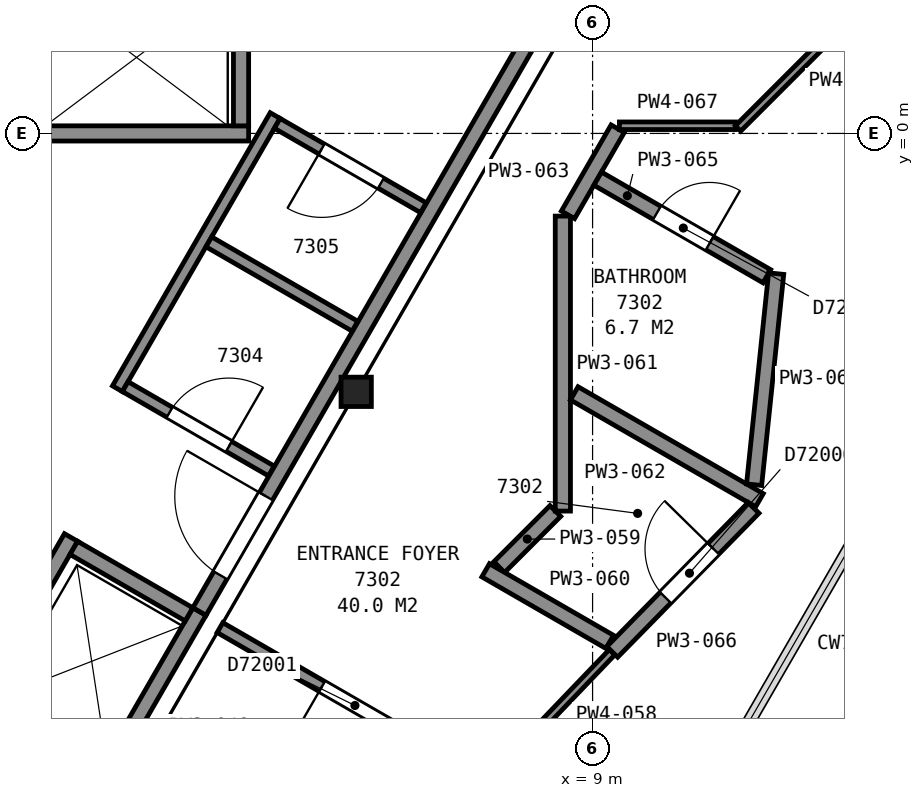
"""IFC4 building model, lengths in metres.
Left out: names, types, materials, properties, quantities, classifications, styles, units other than length and angle.
Written with IfcOpenShell. Run it as: python <this file> out.ifc"""

import sys

from ifc_helpers import new_model, si_unit, direction, frame, frame_2d, origin, origin_2d, place, context, subcontext, project, spatial, rectangle, i_section, extrude, element, fill, save


model = new_model("IFC4")
c1 = context("Model", 3, precision=1e-05, world=origin(), true_north=direction((0.0, 1.0)))
c2 = subcontext(c1, "Body", "Model", "MODEL_VIEW")
j1 = project(units=[si_unit("LENGTHUNIT", "METRE"), si_unit("PLANEANGLEUNIT", "RADIAN")], contexts=[c1])
p1 = place(None, origin())
s1 = spatial("IfcSite", under=j1, at=p1, CompositionType="ELEMENT")
p2 = place(p1, origin())
s2 = spatial("IfcBuilding", under=s1, at=p2, CompositionType="ELEMENT")
p3 = place(p2, frame((0.0, 0.0, 289.9)))
s3 = spatial("IfcBuildingStorey", under=s2, at=p3, CompositionType="ELEMENT", Elevation=289.9)
p4 = place(p3, frame((5.89, -3.4, 0.0), z_axis=(0.0, 0.0, 1.0), x_axis=(1.0, 0.0, 0.0)))
e1 = element("IfcColumn", 1, at=p4, inside=s3, PredefinedType="COLUMN", context=c2, shape_type="SweptSolid", body=[
    extrude(i_section(OverallWidth=0.399, OverallDepth=0.386, WebThickness=0.021, FlangeThickness=0.033, FilletRadius=0.015, at=origin_2d()), origin(), (0.0, 0.0, 1.0), 3.7),
])
p5 = place(p3, frame((1.525, 0.0, 0.0), z_axis=(0.0, 0.0, 1.0), x_axis=(1.0, 0.0, 0.0)))
e2 = element("IfcWall", 2, at=p5, inside=s3, PredefinedType="PARTITIONING", context=c2, shape_type="SweptSolid", body=[
    extrude(rectangle(XDim=2.95, YDim=0.2, at=frame_2d((1.475, 0.0))), origin(), (0.0, 0.0, 1.0), 3.7),
])
p6 = place(p3, frame((2.552, -8.5, 0.0), z_axis=(0.0, 0.0, 1.0), x_axis=(0.499990435942, 0.866030925526, 0.0)))
e3 = element("IfcWall", 3, at=p6, inside=s3, PredefinedType="PARTITIONING", context=c2, shape_type="SweptSolid", body=[
    extrude(rectangle(XDim=2.55, YDim=0.2, at=frame_2d((1.275, 0.0))), origin(), (0.0, 0.0, 1.0), 3.7),
])
p7 = place(p3, frame((0.863, -7.525, 0.0), z_axis=(0.0, 0.0, 1.0), x_axis=(0.499990435942, 0.866030925526, 0.0)))
e4 = element("IfcWall", 4, at=p7, inside=s3, PredefinedType="PARTITIONING", context=c2, shape_type="SweptSolid", body=[
    extrude(rectangle(XDim=2.55, YDim=0.2, at=frame_2d((1.275, 0.0))), origin(), (0.0, 0.0, 1.0), 3.7),
])
p8 = place(p7, frame((0.725, 0.0, 0.0)))
e5 = element("IfcOpeningElement", 5, at=p8, cuts=e4, PredefinedType="OPENING", context=c2, shape_type="SweptSolid", body=[
    extrude(rectangle(XDim=1.1, YDim=2.1, at=frame_2d((0.55, 1.05))), frame((0.0, 0.11, 0.0), z_axis=(0.0, -1.0, 0.0), x_axis=(1.0, 0.0, 0.0)), (0.0, 0.0, 1.0), 0.22),
])
p9 = place(p3, frame((4.375, 0.1, 0.0), z_axis=(0.0, 0.0, 1.0), x_axis=(0.0, 1.0, 0.0)))
e6 = element("IfcWall", 6, at=p9, inside=s3, PredefinedType="PARTITIONING", context=c2, shape_type="SweptSolid", body=[
    extrude(rectangle(XDim=1.95, YDim=0.2, at=frame_2d((0.975, 0.0))), origin(), (0.0, 0.0, 1.0), 3.7),
])
for number, where, z_axis, x_axis in (
    (7, (3.69, -6.328, 0.0), (0.0, 0.0, 1.0), (-0.866, 0.5, 0.0)),
    (8, (2.515, -8.363, 0.0), (0.0, 0.0, 1.0), (-0.866, 0.5, 0.0)),
):
    element("IfcWall", number, at=place(p3, frame(where, z_axis=z_axis, x_axis=x_axis)), inside=s3, PredefinedType="PARTITIONING", context=c2, shape_type="SweptSolid", body=[
        extrude(rectangle(XDim=1.75, YDim=0.2, at=frame_2d((0.875, 0.0))), origin(), (0.0, 0.0, 1.0), 3.7),
    ])
p10 = place(p3, frame((2.749, -3.359, 0.0), z_axis=(0.0, 0.0, 1.0), x_axis=(0.500017827812, 0.866015110648, 0.0)))
e9 = element("IfcWall", 9, at=p10, inside=s3, PredefinedType="PARTITIONING", context=c2, shape_type="SweptSolid", body=[
    extrude(rectangle(XDim=4.15, YDim=0.15, at=frame_2d((2.075, 0.0))), origin(), (0.0, 0.0, 1.0), 3.45),
])
p11 = place(p3, frame((2.851, -3.332, 0.0), z_axis=(0.0, 0.0, 1.0), x_axis=(0.866110524189, -0.499852538144, 0.0)))
e10 = element("IfcWall", 10, at=p11, inside=s3, PredefinedType="PARTITIONING", context=c2, shape_type="SweptSolid", body=[
    extrude(rectangle(XDim=2.22, YDim=0.15, at=frame_2d((1.11, 0.0))), origin(), (0.0, 0.0, 1.0), 3.45),
])
p12 = place(p11, frame((0.675, 0.0, 0.0)))
e11 = element("IfcOpeningElement", 11, at=p12, cuts=e10, PredefinedType="OPENING", context=c2, shape_type="SweptSolid", body=[
    extrude(rectangle(XDim=0.9, YDim=2.1, at=frame_2d((0.45, 1.05))), frame((0.0, 0.085, 0.0), z_axis=(0.0, -1.0, 0.0), x_axis=(1.0, 0.0, 0.0)), (0.0, 0.0, 1.0), 0.17),
])
p13 = place(p3, frame((3.828, -6.29, 0.0), z_axis=(0.0, 0.0, 1.0), x_axis=(0.499979739078, 0.866037101117, 0.0)))
e12 = element("IfcWall", 12, at=p13, inside=s3, PredefinedType="PARTITIONING", context=c2, shape_type="SweptSolid", body=[
    extrude(rectangle(XDim=11.363, YDim=0.2, at=frame_2d((5.681, 0.0))), origin(), (0.0, 0.0, 1.0), 3.45),
])
p14 = place(p13, frame((0.55, 0.0, 0.0)))
e13 = element("IfcOpeningElement", 13, at=p14, cuts=e12, PredefinedType="OPENING", context=c2, shape_type="SweptSolid", body=[
    extrude(rectangle(XDim=1.2, YDim=2.1, at=frame_2d((0.6, 1.05))), frame((0.0, 0.11, 0.0), z_axis=(0.0, -1.0, 0.0), x_axis=(1.0, 0.0, 0.0)), (0.0, 0.0, 1.0), 0.22),
])
p15 = place(p3, frame((3.951, -1.427, 0.0), z_axis=(0.0, 0.0, 1.0), x_axis=(0.866062920605, -0.499935013329, 0.0)))
e14 = element("IfcWall", 14, at=p15, inside=s3, PredefinedType="PARTITIONING", context=c2, shape_type="SweptSolid", body=[
    extrude(rectangle(XDim=2.22, YDim=0.15, at=frame_2d((1.11, 0.0))), origin(), (0.0, 0.0, 1.0), 3.45),
])
p16 = place(p3, frame((6.774, -0.978, 0.0), z_axis=(0.0, 0.0, 1.0), x_axis=(-0.866062920605, 0.499935013329, 0.0)))
e15 = element("IfcWall", 15, at=p16, inside=s3, PredefinedType="PARTITIONING", context=c2, shape_type="SweptSolid", body=[
    extrude(rectangle(XDim=2.22, YDim=0.15, at=frame_2d((1.11, 0.0))), origin(), (0.0, 0.0, 1.0), 3.45),
])
p17 = place(p16, frame((0.646, 0.0, 0.0)))
e16 = element("IfcOpeningElement", 16, at=p17, cuts=e15, PredefinedType="OPENING", context=c2, shape_type="SweptSolid", body=[
    extrude(rectangle(XDim=0.9, YDim=2.1, at=frame_2d((0.45, 1.05))), frame((0.0, 0.085, 0.0), z_axis=(0.0, -1.0, 0.0), x_axis=(1.0, 0.0, 0.0)), (0.0, 0.0, 1.0), 0.17),
])
p18 = place(p3, frame((9.772, -9.777, 0.0), z_axis=(0.0, 0.0, 1.0), x_axis=(-0.866083818164, 0.499898809675, 0.0)))
e17 = element("IfcWall", 17, at=p18, inside=s3, PredefinedType="PARTITIONING", context=c2, shape_type="SweptSolid", body=[
    extrude(rectangle(XDim=6.551, YDim=0.15, at=frame_2d((3.275, 0.0))), origin(), (0.0, 0.0, 1.0), 2.723),
])
p19 = place(p18, frame((4.001, 0.0, 0.0)))
e18 = element("IfcOpeningElement", 18, at=p19, cuts=e17, PredefinedType="OPENING", context=c2, shape_type="SweptSolid", body=[
    extrude(rectangle(XDim=1.0, YDim=2.1, at=frame_2d((0.5, 1.05))), frame((0.0, 0.085, 0.0), z_axis=(0.0, -1.0, 0.0), x_axis=(1.0, 0.0, 0.0)), (0.0, 0.0, 1.0), 0.17),
])
p20 = place(p3, frame((7.681, -8.47, 0.0), z_axis=(0.0, 0.0, 1.0), x_axis=(0.691774963189, 0.722113149239, 0.0)))
e19 = element("IfcWall", 19, at=p20, inside=s3, PredefinedType="PARTITIONING", context=c2, shape_type="SweptSolid", body=[
    extrude(rectangle(XDim=2.277, YDim=0.1, at=frame_2d((1.139, 0.0))), origin(), (0.0, 0.0, 1.0), 2.723),
])
p21 = place(p3, frame((7.772, -5.706, 0.0), z_axis=(0.0, 0.0, 1.0), x_axis=(0.707106781187, 0.707106781187, 0.0)))
e20 = element("IfcWall", 20, at=p21, inside=s3, PredefinedType="PARTITIONING", context=c2, shape_type="SweptSolid", body=[
    extrude(rectangle(XDim=1.044, YDim=0.2, at=frame_2d((0.522, 0.0))), origin(), (0.0, 0.0, 1.0), 2.723),
])
p22 = place(p3, frame((7.594, -5.748, 0.0), z_axis=(0.0, 0.0, 1.0), x_axis=(0.866049635583, -0.499958026946, 0.0)))
e21 = element("IfcWall", 21, at=p22, inside=s3, PredefinedType="PARTITIONING", context=c2, shape_type="SweptSolid", body=[
    extrude(rectangle(XDim=1.884, YDim=0.2, at=frame_2d((0.942, 0.0))), origin(), (0.0, 0.0, 1.0), 2.723),
])
p23 = place(p3, frame((8.609, -4.969, 0.0), z_axis=(0.0, 0.0, 1.0), x_axis=(0.0, 1.0, 0.0)))
e22 = element("IfcWall", 22, at=p23, inside=s3, PredefinedType="PARTITIONING", context=c2, shape_type="SweptSolid", body=[
    extrude(rectangle(XDim=3.881, YDim=0.2, at=frame_2d((1.94, 0.0))), origin(), (0.0, 0.0, 1.0), 2.723),
])
p24 = place(p3, frame((8.759, -3.42, 0.0), z_axis=(0.0, 0.0, 1.0), x_axis=(0.866098885879, -0.499872703674, 0.0)))
e23 = element("IfcWall", 23, at=p24, inside=s3, PredefinedType="PARTITIONING", context=c2, shape_type="SweptSolid", body=[
    extrude(rectangle(XDim=2.813, YDim=0.2, at=frame_2d((1.407, 0.0))), origin(), (0.0, 0.0, 1.0), 2.723),
])
p25 = place(p3, frame((8.677, -1.071, 0.0), z_axis=(0.0, 0.0, 1.0), x_axis=(0.49993245451, 0.866064397679, 0.0)))
e24 = element("IfcWall", 24, at=p25, inside=s3, PredefinedType="PARTITIONING", context=c2, shape_type="SweptSolid", body=[
    extrude(rectangle(XDim=1.308, YDim=0.2, at=frame_2d((0.654, 0.0))), origin(), (0.0, 0.0, 1.0), 2.723),
])
p26 = place(p3, frame((11.292, -1.879, 0.0), z_axis=(0.0, 0.0, 1.0), x_axis=(-0.866123870273, 0.499829412243, 0.0)))
e25 = element("IfcWall", 25, at=p26, inside=s3, PredefinedType="PARTITIONING", context=c2, shape_type="SweptSolid", body=[
    extrude(rectangle(XDim=2.569, YDim=0.2, at=frame_2d((1.284, 0.0))), origin(), (0.0, 0.0, 1.0), 2.723),
])
p27 = place(p26, frame((0.869, 0.0, 0.0)))
e26 = element("IfcOpeningElement", 26, at=p27, cuts=e25, PredefinedType="OPENING", context=c2, shape_type="SweptSolid", body=[
    extrude(rectangle(XDim=0.8, YDim=2.1, at=frame_2d((0.4, 1.05))), frame((0.0, 0.11, 0.0), z_axis=(0.0, -1.0, 0.0), x_axis=(1.0, 0.0, 0.0)), (0.0, 0.0, 1.0), 0.22),
])
p28 = place(p3, frame((9.259, -6.821, 0.0), z_axis=(0.0, 0.0, 1.0), x_axis=(0.700360124324, 0.713789672282, 0.0)))
e27 = element("IfcWall", 27, at=p28, inside=s3, PredefinedType="PARTITIONING", context=c2, shape_type="SweptSolid", body=[
    extrude(rectangle(XDim=2.654, YDim=0.2, at=frame_2d((1.327, 0.0))), origin(), (0.0, 0.0, 1.0), 2.723),
])
p29 = place(p28, frame((1.0, 0.0, 0.0)))
e28 = element("IfcOpeningElement", 28, at=p29, cuts=e27, PredefinedType="OPENING", context=c2, shape_type="SweptSolid", body=[
    extrude(rectangle(XDim=0.9, YDim=2.1, at=frame_2d((0.45, 1.05))), frame((0.0, 0.11, 0.0), z_axis=(0.0, -1.0, 0.0), x_axis=(1.0, 0.0, 0.0)), (0.0, 0.0, 1.0), 0.22),
])
p30 = place(p3, frame((9.353, 0.101, 0.0), z_axis=(0.0, 0.0, 1.0), x_axis=(1.0, 0.0, 0.0)))
e29 = element("IfcWall", 29, at=p30, inside=s3, PredefinedType="PARTITIONING", context=c2, shape_type="SweptSolid", body=[
    extrude(rectangle(XDim=1.526, YDim=0.1, at=frame_2d((0.763, 0.0))), origin(), (0.0, 0.0, 1.0), 2.723),
])
p31 = place(p3, frame((10.914, 0.066, 0.0), z_axis=(0.0, 0.0, 1.0), x_axis=(0.707106781187, 0.707106781187, 0.0)))
e30 = element("IfcWall", 30, at=p31, inside=s3, PredefinedType="PARTITIONING", context=c2, shape_type="SweptSolid", body=[
    extrude(rectangle(XDim=1.748, YDim=0.1, at=frame_2d((0.874, 0.0))), origin(), (0.0, 0.0, 1.0), 2.723),
])
p32 = place(p3, frame((11.125, -4.622, 0.0), z_axis=(0.0, 0.0, 1.0), x_axis=(0.103952036587, 0.99458231137, 0.0)))
e31 = element("IfcWall", 31, at=p32, inside=s3, PredefinedType="PARTITIONING", context=c2, shape_type="SweptSolid", body=[
    extrude(rectangle(XDim=2.792, YDim=0.2, at=frame_2d((1.396, 0.0))), origin(), (0.0, 0.0, 1.0), 2.723),
])
p33 = place(p12, origin())
e32 = element("IfcDoor", 32, at=p33, inside=s3, OperationType="SINGLE_SWING_RIGHT", PredefinedType="DOOR", context=c2, shape_type="SweptSolid", body=[
    extrude(rectangle(XDim=0.9, YDim=2.1, at=frame_2d((0.45, 1.05))), frame((0.0, 0.025, 0.0), z_axis=(0.0, -1.0, 0.0), x_axis=(1.0, 0.0, 0.0)), (0.0, 0.0, 1.0), 0.05),
])
fill(e11, e32)
p34 = place(p14, origin())
e33 = element("IfcDoor", 33, at=p34, inside=s3, OperationType="SINGLE_SWING_RIGHT", PredefinedType="DOOR", context=c2, shape_type="SweptSolid", body=[
    extrude(rectangle(XDim=1.2, YDim=2.1, at=frame_2d((0.6, 1.05))), frame((0.0, 0.025, 0.0), z_axis=(0.0, -1.0, 0.0), x_axis=(1.0, 0.0, 0.0)), (0.0, 0.0, 1.0), 0.05),
])
fill(e13, e33)
p35 = place(p17, origin())
e34 = element("IfcDoor", 34, at=p35, inside=s3, OperationType="SINGLE_SWING_RIGHT", PredefinedType="DOOR", context=c2, shape_type="SweptSolid", body=[
    extrude(rectangle(XDim=0.9, YDim=2.1, at=frame_2d((0.45, 1.05))), frame((0.0, 0.025, 0.0), z_axis=(0.0, -1.0, 0.0), x_axis=(1.0, 0.0, 0.0)), (0.0, 0.0, 1.0), 0.05),
])
fill(e16, e34)
p36 = place(p19, origin())
e35 = element("IfcDoor", 35, at=p36, inside=s3, OperationType="SINGLE_SWING_RIGHT", PredefinedType="DOOR", context=c2, shape_type="SweptSolid", body=[
    extrude(rectangle(XDim=1.0, YDim=2.1, at=frame_2d((0.5, 1.05))), frame((0.0, 0.025, 0.0), z_axis=(0.0, -1.0, 0.0), x_axis=(1.0, 0.0, 0.0)), (0.0, 0.0, 1.0), 0.05),
])
fill(e18, e35)
p37 = place(p27, origin())
e36 = element("IfcDoor", 36, at=p37, inside=s3, OperationType="SINGLE_SWING_LEFT", PredefinedType="DOOR", context=c2, shape_type="SweptSolid", body=[
    extrude(rectangle(XDim=0.8, YDim=2.1, at=frame_2d((0.4, 1.05))), frame((0.0, 0.025, 0.0), z_axis=(0.0, -1.0, 0.0), x_axis=(1.0, 0.0, 0.0)), (0.0, 0.0, 1.0), 0.05),
])
fill(e26, e36)
p38 = place(p29, origin())
e37 = element("IfcDoor", 37, at=p38, inside=s3, OperationType="SINGLE_SWING_RIGHT", PredefinedType="DOOR", context=c2, shape_type="SweptSolid", body=[
    extrude(rectangle(XDim=0.9, YDim=2.1, at=frame_2d((0.45, 1.05))), frame((0.0, 0.025, 0.0), z_axis=(0.0, -1.0, 0.0), x_axis=(1.0, 0.0, 0.0)), (0.0, 0.0, 1.0), 0.05),
])
fill(e28, e37)
save(model, sys.argv[1])
